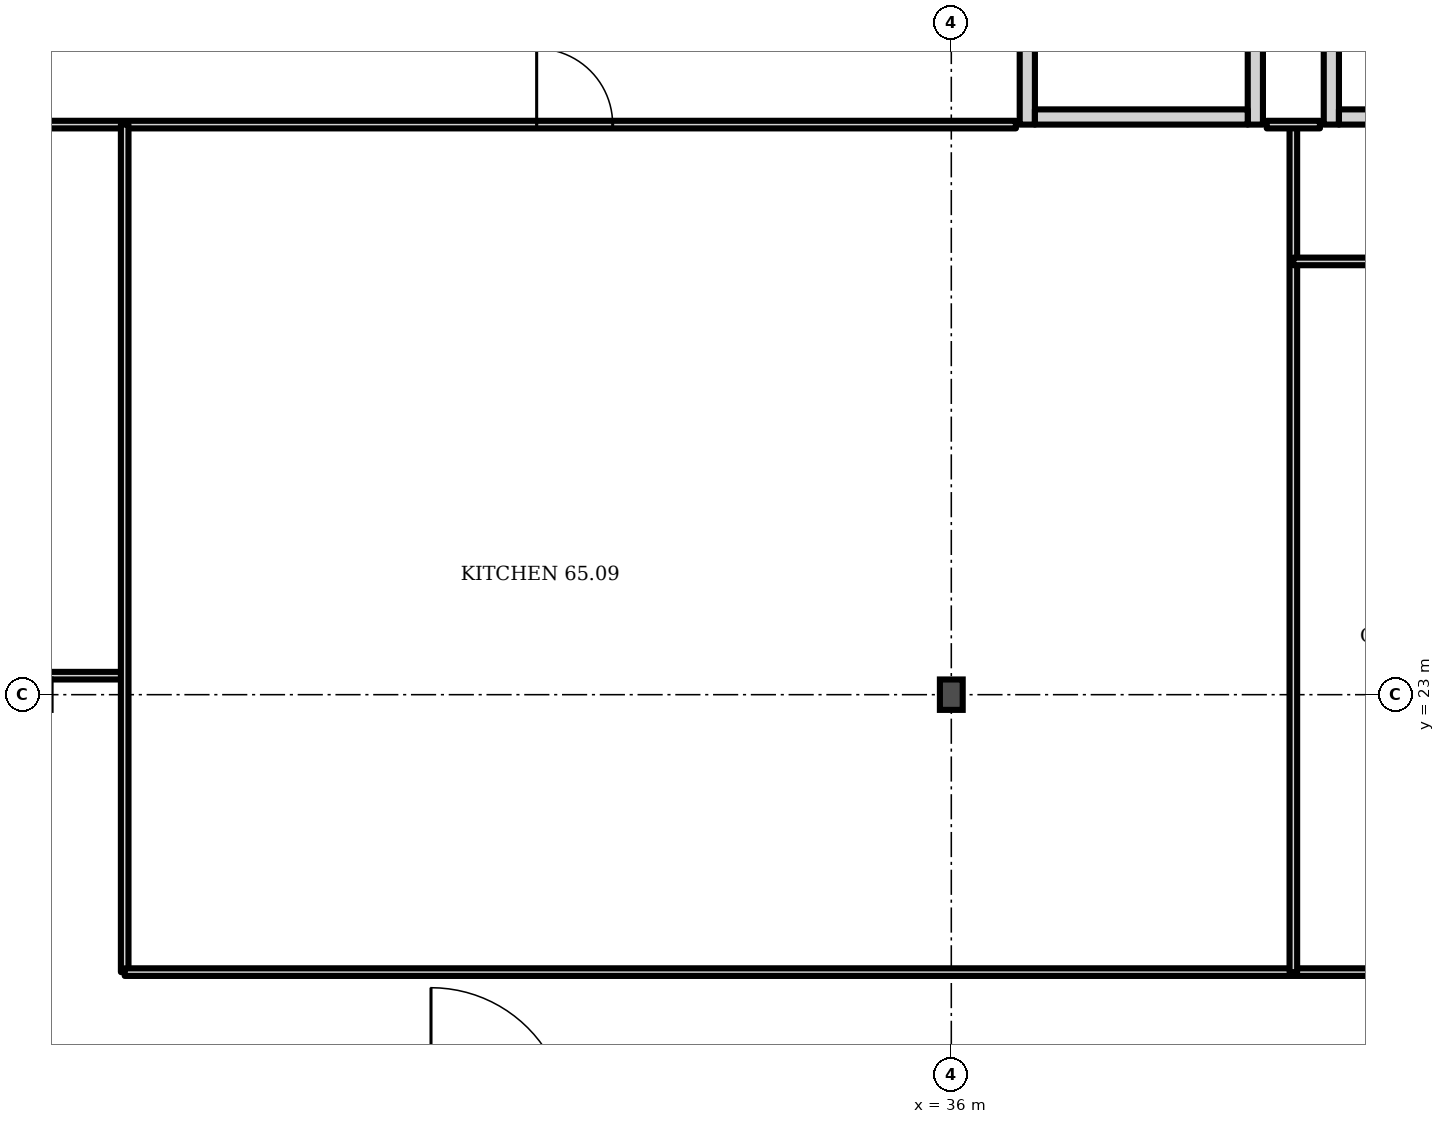
"""IFC4 building model, lengths in metres.
Left out: names, types, materials, properties, quantities, classifications, styles, units other than length and angle.
Written with IfcOpenShell. Run it as: python <this file> out.ifc"""

import sys

from ifc_helpers import new_model, si_unit, direction, frame, frame_2d, origin, origin_2d, place, context, subcontext, project, spatial, rectangle, i_section, extrude, element, fill, save


model = new_model("IFC4")
c1 = context("Model", 3, precision=1e-05, world=origin(), true_north=direction((0.0, 1.0)))
c2 = subcontext(c1, "Body", "Model", "MODEL_VIEW")
j1 = project(units=[si_unit("LENGTHUNIT", "METRE"), si_unit("PLANEANGLEUNIT", "RADIAN")], contexts=[c1])
p1 = place(None, origin())
s1 = spatial("IfcSite", under=j1, at=p1, CompositionType="ELEMENT")
p2 = place(p1, origin())
s2 = spatial("IfcBuilding", under=s1, at=p2, CompositionType="ELEMENT")
p3 = place(p2, frame((0.0, 0.0, 257.5)))
s3 = spatial("IfcBuildingStorey", under=s2, at=p3, CompositionType="ELEMENT", Elevation=257.5)
p4 = place(p3, frame((36.0, 23.0, 0.0), z_axis=(0.0, 0.0, 1.0), x_axis=(1.0, 0.0, 0.0)))
e1 = element("IfcColumn", 1, at=p4, inside=s3, PredefinedType="COLUMN", context=c2, shape_type="SweptSolid", body=[
    extrude(i_section(OverallWidth=0.3, OverallDepth=0.4, WebThickness=0.013, FlangeThickness=0.024, FilletRadius=0.027, at=origin_2d()), origin(), (0.0, 0.0, 1.0), 3.6),
])
p5 = place(p3, frame((37.0, 30.5, 0.0), z_axis=(0.0, 0.0, 1.0), x_axis=(0.0, 1.0, 0.0)))
e2 = element("IfcWall", 2, at=p5, inside=s3, PredefinedType="PARTITIONING", context=c2, shape_type="SweptSolid", body=[
    extrude(rectangle(XDim=3.5, YDim=0.2, at=frame_2d((1.75, 0.0))), origin(), (0.0, 0.0, 1.0), 3.2),
])
p6 = place(p5, frame((1.2, 0.0, 0.0)))
e3 = element("IfcOpeningElement", 3, at=p6, cuts=e2, PredefinedType="OPENING", context=c2, shape_type="SweptSolid", body=[
    extrude(rectangle(XDim=1.1, YDim=2.1, at=frame_2d((0.55, 1.05))), frame((0.0, 0.11, 0.0), z_axis=(0.0, -1.0, 0.0), x_axis=(1.0, 0.0, 0.0)), (0.0, 0.0, 1.0), 0.22),
])
p7 = place(p3, frame((40.0, 30.5, 0.0), z_axis=(0.0, 0.0, 1.0), x_axis=(0.0, 1.0, 0.0)))
e4 = element("IfcWall", 4, at=p7, inside=s3, PredefinedType="PARTITIONING", context=c2, shape_type="SweptSolid", body=[
    extrude(rectangle(XDim=3.5, YDim=0.2, at=frame_2d((1.75, 0.0))), origin(), (0.0, 0.0, 1.0), 3.2),
])
p8 = place(p3, frame((37.1, 30.6, 0.0), z_axis=(0.0, 0.0, 1.0), x_axis=(1.0, 0.0, 0.0)))
e5 = element("IfcWall", 5, at=p8, inside=s3, PredefinedType="PARTITIONING", context=c2, shape_type="SweptSolid", body=[
    extrude(rectangle(XDim=2.8, YDim=0.2, at=frame_2d((1.4, 0.0))), origin(), (0.0, 0.0, 1.0), 3.2),
])
p9 = place(p3, frame((41.0, 30.5, 0.0), z_axis=(0.0, 0.0, 1.0), x_axis=(0.0, 1.0, 0.0)))
e6 = element("IfcWall", 6, at=p9, inside=s3, PredefinedType="PARTITIONING", context=c2, shape_type="SweptSolid", body=[
    extrude(rectangle(XDim=3.5, YDim=0.2, at=frame_2d((1.75, 0.0))), origin(), (0.0, 0.0, 1.0), 3.2),
])
p10 = place(p3, frame((41.1, 30.6, 0.0), z_axis=(0.0, 0.0, 1.0), x_axis=(1.0, 0.0, 0.0)))
e7 = element("IfcWall", 7, at=p10, inside=s3, PredefinedType="PARTITIONING", context=c2, shape_type="SweptSolid", body=[
    extrude(rectangle(XDim=2.8, YDim=0.2, at=frame_2d((1.4, 0.0))), origin(), (0.0, 0.0, 1.0), 3.2),
])
p11 = place(p3, frame((23.0, 30.5, 0.0), z_axis=(0.0, 0.0, 1.0), x_axis=(1.0, 0.0, 0.0)))
e8 = element("IfcWall", 8, at=p11, inside=s3, PredefinedType="PARTITIONING", context=c2, shape_type="SweptSolid", body=[
    extrude(rectangle(XDim=13.85, YDim=0.1, at=frame_2d((6.925, 0.0))), origin(), (0.0, 0.0, 1.0), 3.2),
])
p12 = place(p11, frame((7.545, 0.0, 0.0)))
e9 = element("IfcOpeningElement", 9, at=p12, cuts=e8, PredefinedType="OPENING", context=c2, shape_type="SweptSolid", body=[
    extrude(rectangle(XDim=1.0, YDim=2.1, at=frame_2d((0.5, 1.05))), frame((0.0, 0.06, 0.0), z_axis=(0.0, -1.0, 0.0), x_axis=(1.0, 0.0, 0.0)), (0.0, 0.0, 1.0), 0.12),
])
p13 = place(p3, frame((23.02, 23.25, 0.0), z_axis=(0.0, 0.0, 1.0), x_axis=(1.0, 0.0, 0.0)))
e10 = element("IfcWall", 10, at=p13, inside=s3, PredefinedType="PARTITIONING", context=c2, shape_type="SweptSolid", body=[
    extrude(rectangle(XDim=2.105, YDim=0.1, at=frame_2d((1.052, 0.0))), origin(), (0.0, 0.0, 1.0), 3.2),
])
p14 = place(p3, frame((25.125, 19.35, 0.0), z_axis=(0.0, 0.0, 1.0), x_axis=(0.0, 1.0, 0.0)))
e11 = element("IfcWall", 11, at=p14, inside=s3, PredefinedType="PARTITIONING", context=c2, shape_type="SweptSolid", body=[
    extrude(rectangle(XDim=11.15, YDim=0.1, at=frame_2d((5.575, 0.0))), origin(), (0.0, 0.0, 1.0), 3.2),
])
p15 = place(p3, frame((25.125, 19.35, 0.0), z_axis=(0.0, 0.0, 1.0), x_axis=(1.0, 0.0, 0.0)))
e12 = element("IfcWall", 12, at=p15, inside=s3, PredefinedType="PARTITIONING", context=c2, shape_type="SweptSolid", body=[
    extrude(rectangle(XDim=31.475, YDim=0.1, at=frame_2d((15.738, 0.0))), origin(), (0.0, 0.0, 1.0), 3.2),
])
p16 = place(p3, frame((40.5, 19.35, 0.0), z_axis=(0.0, 0.0, 1.0), x_axis=(0.0, 1.0, 0.0)))
e13 = element("IfcWall", 13, at=p16, inside=s3, PredefinedType="PARTITIONING", context=c2, shape_type="SweptSolid", body=[
    extrude(rectangle(XDim=11.14, YDim=0.1, at=frame_2d((5.57, 0.0))), origin(), (0.0, 0.0, 1.0), 3.2),
])
p17 = place(p3, frame((40.5, 28.7, 0.0), z_axis=(0.0, 0.0, 1.0), x_axis=(1.0, 0.0, 0.0)))
e14 = element("IfcWall", 14, at=p17, inside=s3, PredefinedType="PARTITIONING", context=c2, shape_type="SweptSolid", body=[
    extrude(rectangle(XDim=10.25, YDim=0.1, at=frame_2d((5.125, 0.0))), origin(), (0.0, 0.0, 1.0), 3.2),
])
p18 = place(p17, frame((1.67, 0.0, 0.0)))
e15 = element("IfcOpeningElement", 15, at=p18, cuts=e14, PredefinedType="OPENING", context=c2, shape_type="SweptSolid", body=[
    extrude(rectangle(XDim=0.9, YDim=2.1, at=frame_2d((0.45, 1.05))), frame((0.0, 0.06, 0.0), z_axis=(0.0, -1.0, 0.0), x_axis=(1.0, 0.0, 0.0)), (0.0, 0.0, 1.0), 0.12),
])
p19 = place(p17, frame((5.52, 0.0, 0.0)))
e16 = element("IfcOpeningElement", 16, at=p19, cuts=e14, PredefinedType="OPENING", context=c2, shape_type="SweptSolid", body=[
    extrude(rectangle(XDim=0.9, YDim=2.1, at=frame_2d((0.45, 1.05))), frame((0.0, 0.06, 0.0), z_axis=(0.0, -1.0, 0.0), x_axis=(1.0, 0.0, 0.0)), (0.0, 0.0, 1.0), 0.12),
])
p20 = place(p17, frame((8.61, 0.0, 0.0)))
e17 = element("IfcOpeningElement", 17, at=p20, cuts=e14, PredefinedType="OPENING", context=c2, shape_type="SweptSolid", body=[
    extrude(rectangle(XDim=1.0, YDim=2.1, at=frame_2d((0.5, 1.05))), frame((0.0, 0.06, 0.0), z_axis=(0.0, -1.0, 0.0), x_axis=(1.0, 0.0, 0.0)), (0.0, 0.0, 1.0), 0.12),
])
p21 = place(p3, frame((40.15, 30.5, 0.0), z_axis=(0.0, 0.0, 1.0), x_axis=(1.0, 0.0, 0.0)))
e18 = element("IfcWall", 18, at=p21, inside=s3, PredefinedType="PARTITIONING", context=c2, shape_type="SweptSolid", body=[
    extrude(rectangle(XDim=0.7, YDim=0.1, at=frame_2d((0.35, 0.0))), origin(), (0.0, 0.0, 1.0), 3.2),
])
p22 = place(p12, origin())
e19 = element("IfcDoor", 19, at=p22, inside=s3, OperationType="SINGLE_SWING_LEFT", PredefinedType="DOOR", context=c2, shape_type="SweptSolid", body=[
    extrude(rectangle(XDim=1.0, YDim=2.1, at=frame_2d((0.5, 1.05))), frame((0.0, 0.025, 0.0), z_axis=(0.0, -1.0, 0.0), x_axis=(1.0, 0.0, 0.0)), (0.0, 0.0, 1.0), 0.05),
])
fill(e9, e19)
save(model, sys.argv[1])
